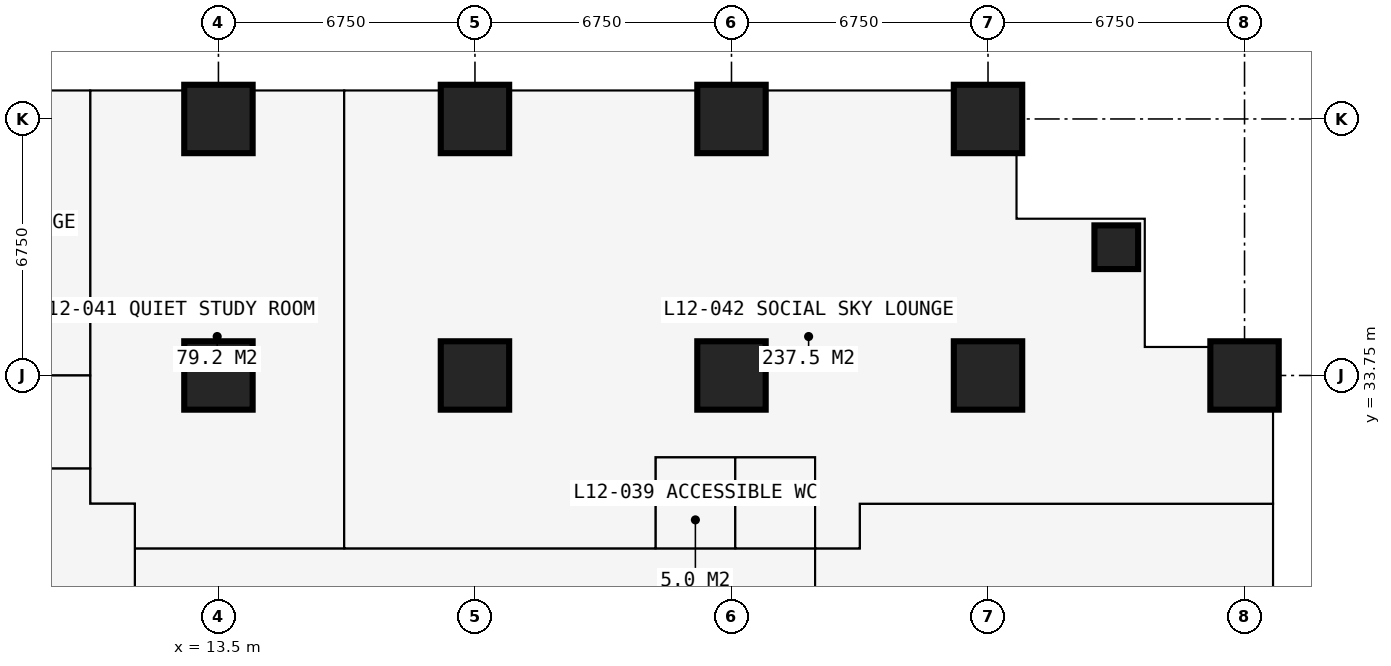
"""IFC4 building model, lengths in metres.
Left out: names, types, materials, properties, quantities, classifications, styles, units other than length and angle.
Written with IfcOpenShell. Run it as: python <this file> out.ifc"""

import sys

from ifc_helpers import new_model, si_unit, direction, frame, frame_2d, origin, origin_2d, place, context, subcontext, project, spatial, rectangle, extrude, element, fill, save


model = new_model("IFC4")
c1 = context("Model", 3, precision=1e-05, world=origin(), true_north=direction((0.0, 1.0)))
c2 = subcontext(c1, "Body", "Model", "MODEL_VIEW")
j1 = project(units=[si_unit("LENGTHUNIT", "METRE"), si_unit("PLANEANGLEUNIT", "RADIAN")], contexts=[c1])
p1 = place(None, origin())
s1 = spatial("IfcSite", under=j1, at=p1, CompositionType="ELEMENT")
p2 = place(p1, origin())
s2 = spatial("IfcBuilding", under=s1, at=p2, CompositionType="ELEMENT")
p3 = place(p2, frame((0.0, 0.0, 46.8)))
s3 = spatial("IfcBuildingStorey", under=s2, at=p3, CompositionType="ELEMENT", Elevation=46.8)
for number, where, z_axis, x_axis in (
    (1, (13.5, 33.75, 0.0), (0.0, 0.0, 1.0), (1.0, 0.0, 0.0)),
    (2, (13.5, 40.5, 0.0), (0.0, 0.0, 1.0), (1.0, 0.0, 0.0)),
    (3, (20.25, 33.75, 0.0), (0.0, 0.0, 1.0), (1.0, 0.0, 0.0)),
    (4, (20.25, 40.5, 0.0), (0.0, 0.0, 1.0), (1.0, 0.0, 0.0)),
    (5, (27.0, 33.75, 0.0), (0.0, 0.0, 1.0), (1.0, 0.0, 0.0)),
    (6, (27.0, 40.5, 0.0), (0.0, 0.0, 1.0), (1.0, 0.0, 0.0)),
    (7, (33.75, 33.75, 0.0), (0.0, 0.0, 1.0), (1.0, 0.0, 0.0)),
    (8, (33.75, 40.5, 0.0), (0.0, 0.0, 1.0), (1.0, 0.0, 0.0)),
):
    element("IfcColumn", number, at=place(p3, frame(where, z_axis=z_axis, x_axis=x_axis)), inside=s3, PredefinedType="COLUMN", context=c2, shape_type="SweptSolid", body=[
        extrude(rectangle(XDim=1.8, YDim=1.8, at=origin_2d()), origin(), (0.0, 0.0, 1.0), 3.6),
    ])
p4 = place(p3, frame((37.125, 37.125, 0.0), z_axis=(0.0, 0.0, 1.0), x_axis=(1.0, 0.0, 0.0)))
e9 = element("IfcColumn", 9, at=p4, inside=s3, PredefinedType="COLUMN", context=c2, shape_type="SweptSolid", body=[
    extrude(rectangle(XDim=1.15, YDim=1.15, at=origin_2d()), origin(), (0.0, 0.0, 1.0), 3.6),
])
p5 = place(p3, frame((40.5, 33.75, 0.0), z_axis=(0.0, 0.0, 1.0), x_axis=(1.0, 0.0, 0.0)))
e10 = element("IfcColumn", 10, at=p5, inside=s3, PredefinedType="COLUMN", context=c2, shape_type="SweptSolid", body=[
    extrude(rectangle(XDim=1.8, YDim=1.8, at=origin_2d()), origin(), (0.0, 0.0, 1.0), 3.6),
])
p6 = place(p3, frame((41.25, 34.5, 0.0), z_axis=(0.0, 0.0, 1.0), x_axis=(-1.0, 0.0, 0.0)))
e11 = element("IfcWall", 11, at=p6, inside=s3, PredefinedType="SOLIDWALL", context=c2, shape_type="SweptSolid", body=[
    extrude(rectangle(XDim=3.375, YDim=0.3, at=frame_2d((1.688, 0.0))), origin(), (0.0, 0.0, 1.0), 3.375),
])
p7 = place(p6, frame((1.833, 0.0, 0.9)))
e12 = element("IfcOpeningElement", 12, at=p7, cuts=e11, PredefinedType="OPENING", context=c2, shape_type="SweptSolid", body=[
    extrude(rectangle(XDim=1.2, YDim=1.8, at=frame_2d((0.6, 0.9))), frame((0.0, 0.16, 0.0), z_axis=(0.0, -1.0, 0.0), x_axis=(1.0, 0.0, 0.0)), (0.0, 0.0, 1.0), 0.32),
])
p8 = place(p3, frame((37.875, 34.5, 0.0), z_axis=(0.0, 0.0, 1.0), x_axis=(0.0, 1.0, 0.0)))
e13 = element("IfcWall", 13, at=p8, inside=s3, PredefinedType="SOLIDWALL", context=c2, shape_type="SweptSolid", body=[
    extrude(rectangle(XDim=3.375, YDim=0.3, at=frame_2d((1.688, 0.0))), origin(), (0.0, 0.0, 1.0), 3.375),
])
p9 = place(p8, frame((0.788, 0.0, 0.6)))
e14 = element("IfcOpeningElement", 14, at=p9, cuts=e13, PredefinedType="OPENING", context=c2, shape_type="SweptSolid", body=[
    extrude(rectangle(XDim=1.8, YDim=2.1, at=frame_2d((0.9, 1.05))), frame((0.0, 0.16, 0.0), z_axis=(0.0, -1.0, 0.0), x_axis=(1.0, 0.0, 0.0)), (0.0, 0.0, 1.0), 0.32),
])
p10 = place(p3, frame((37.875, 37.875, 0.0), z_axis=(0.0, 0.0, 1.0), x_axis=(-1.0, 0.0, 0.0)))
e15 = element("IfcWall", 15, at=p10, inside=s3, PredefinedType="SOLIDWALL", context=c2, shape_type="SweptSolid", body=[
    extrude(rectangle(XDim=3.375, YDim=0.3, at=frame_2d((1.688, 0.0))), origin(), (0.0, 0.0, 1.0), 3.375),
])
p11 = place(p10, frame((0.788, 0.0, 0.6)))
e16 = element("IfcOpeningElement", 16, at=p11, cuts=e15, PredefinedType="OPENING", context=c2, shape_type="SweptSolid", body=[
    extrude(rectangle(XDim=1.8, YDim=2.1, at=frame_2d((0.9, 1.05))), frame((0.0, 0.16, 0.0), z_axis=(0.0, -1.0, 0.0), x_axis=(1.0, 0.0, 0.0)), (0.0, 0.0, 1.0), 0.32),
])
p12 = place(p3, frame((34.5, 37.875, 0.0), z_axis=(0.0, 0.0, 1.0), x_axis=(0.0, 1.0, 0.0)))
e17 = element("IfcWall", 17, at=p12, inside=s3, PredefinedType="SOLIDWALL", context=c2, shape_type="SweptSolid", body=[
    extrude(rectangle(XDim=3.375, YDim=0.3, at=frame_2d((1.688, 0.0))), origin(), (0.0, 0.0, 1.0), 3.375),
])
p13 = place(p12, frame((0.343, 0.0, 0.9)))
e18 = element("IfcOpeningElement", 18, at=p13, cuts=e17, PredefinedType="OPENING", context=c2, shape_type="SweptSolid", body=[
    extrude(rectangle(XDim=1.2, YDim=1.8, at=frame_2d((0.6, 0.9))), frame((0.0, 0.16, 0.0), z_axis=(0.0, -1.0, 0.0), x_axis=(1.0, 0.0, 0.0)), (0.0, 0.0, 1.0), 0.32),
])
p14 = place(p3, frame((13.5, 41.25, 0.0), z_axis=(0.0, 0.0, 1.0), x_axis=(1.0, 0.0, 0.0)))
e19 = element("IfcWall", 19, at=p14, inside=s3, PredefinedType="SOLIDWALL", context=c2, shape_type="SweptSolid", body=[
    extrude(rectangle(XDim=6.75, YDim=0.15, at=frame_2d((3.375, 0.0))), origin(), (0.0, 0.0, 1.0), 3.375),
])
p15 = place(p14, frame((0.962, 0.0, 0.0)))
e20 = element("IfcOpeningElement", 20, at=p15, cuts=e19, PredefinedType="OPENING", context=c2, shape_type="SweptSolid", body=[
    extrude(rectangle(XDim=1.0, YDim=2.2, at=frame_2d((0.5, 1.1))), frame((0.0, 0.085, 0.0), z_axis=(0.0, -1.0, 0.0), x_axis=(1.0, 0.0, 0.0)), (0.0, 0.0, 1.0), 0.17),
])
p16 = place(p14, frame((2.025, 0.0, 0.9)))
e21 = element("IfcOpeningElement", 21, at=p16, cuts=e19, PredefinedType="OPENING", context=c2, shape_type="SweptSolid", body=[
    extrude(rectangle(XDim=1.2, YDim=1.8, at=frame_2d((0.6, 0.9))), frame((0.0, 0.085, 0.0), z_axis=(0.0, -1.0, 0.0), x_axis=(1.0, 0.0, 0.0)), (0.0, 0.0, 1.0), 0.17),
])
p17 = place(p14, frame((4.788, 0.0, 0.0)))
e22 = element("IfcOpeningElement", 22, at=p17, cuts=e19, PredefinedType="OPENING", context=c2, shape_type="SweptSolid", body=[
    extrude(rectangle(XDim=1.0, YDim=2.2, at=frame_2d((0.5, 1.1))), frame((0.0, 0.085, 0.0), z_axis=(0.0, -1.0, 0.0), x_axis=(1.0, 0.0, 0.0)), (0.0, 0.0, 1.0), 0.17),
])
p18 = place(p14, frame((3.525, 0.0, 0.9)))
e23 = element("IfcOpeningElement", 23, at=p18, cuts=e19, PredefinedType="OPENING", context=c2, shape_type="SweptSolid", body=[
    extrude(rectangle(XDim=1.2, YDim=1.8, at=frame_2d((0.6, 0.9))), frame((0.0, 0.085, 0.0), z_axis=(0.0, -1.0, 0.0), x_axis=(1.0, 0.0, 0.0)), (0.0, 0.0, 1.0), 0.17),
])
p19 = place(p3, frame((20.25, 41.25, 0.0), z_axis=(0.0, 0.0, 1.0), x_axis=(1.0, 0.0, 0.0)))
e24 = element("IfcWall", 24, at=p19, inside=s3, PredefinedType="SOLIDWALL", context=c2, shape_type="SweptSolid", body=[
    extrude(rectangle(XDim=6.75, YDim=0.15, at=frame_2d((3.375, 0.0))), origin(), (0.0, 0.0, 1.0), 3.375),
])
p20 = place(p19, frame((0.962, 0.0, 0.0)))
e25 = element("IfcOpeningElement", 25, at=p20, cuts=e24, PredefinedType="OPENING", context=c2, shape_type="SweptSolid", body=[
    extrude(rectangle(XDim=1.0, YDim=2.2, at=frame_2d((0.5, 1.1))), frame((0.0, 0.085, 0.0), z_axis=(0.0, -1.0, 0.0), x_axis=(1.0, 0.0, 0.0)), (0.0, 0.0, 1.0), 0.17),
])
p21 = place(p19, frame((2.025, 0.0, 0.9)))
e26 = element("IfcOpeningElement", 26, at=p21, cuts=e24, PredefinedType="OPENING", context=c2, shape_type="SweptSolid", body=[
    extrude(rectangle(XDim=1.2, YDim=1.8, at=frame_2d((0.6, 0.9))), frame((0.0, 0.085, 0.0), z_axis=(0.0, -1.0, 0.0), x_axis=(1.0, 0.0, 0.0)), (0.0, 0.0, 1.0), 0.17),
])
p22 = place(p19, frame((4.788, 0.0, 0.0)))
e27 = element("IfcOpeningElement", 27, at=p22, cuts=e24, PredefinedType="OPENING", context=c2, shape_type="SweptSolid", body=[
    extrude(rectangle(XDim=1.0, YDim=2.2, at=frame_2d((0.5, 1.1))), frame((0.0, 0.085, 0.0), z_axis=(0.0, -1.0, 0.0), x_axis=(1.0, 0.0, 0.0)), (0.0, 0.0, 1.0), 0.17),
])
p23 = place(p19, frame((3.525, 0.0, 0.9)))
e28 = element("IfcOpeningElement", 28, at=p23, cuts=e24, PredefinedType="OPENING", context=c2, shape_type="SweptSolid", body=[
    extrude(rectangle(XDim=1.2, YDim=1.8, at=frame_2d((0.6, 0.9))), frame((0.0, 0.085, 0.0), z_axis=(0.0, -1.0, 0.0), x_axis=(1.0, 0.0, 0.0)), (0.0, 0.0, 1.0), 0.17),
])
for number, where, z_axis, x_axis in (
    (29, (16.875, 41.35, 0.0), (0.0, 0.0, 1.0), (0.0, 1.0, 0.0)),
    (30, (23.625, 41.35, 0.0), (0.0, 0.0, 1.0), (0.0, 1.0, 0.0)),
):
    element("IfcWall", number, at=place(p3, frame(where, z_axis=z_axis, x_axis=x_axis)), inside=s3, PredefinedType="USERDEFINED", context=c2, shape_type="SweptSolid", body=[
        extrude(rectangle(XDim=2.2, YDim=1.0, at=frame_2d((1.1, 0.0))), origin(), (0.0, 0.0, 1.0), 0.9),
    ])
p24 = place(p3, frame((-0.734, 33.75, 0.0), z_axis=(0.0, 0.0, 1.0), x_axis=(1.0, 0.0, 0.0)))
e31 = element("IfcWall", 31, at=p24, inside=s3, PredefinedType="PARTITIONING", context=c2, shape_type="SweptSolid", body=[
    extrude(rectangle(XDim=10.859, YDim=0.15, at=frame_2d((5.429, 0.0))), origin(), (0.0, 0.0, 1.0), 2.877),
])
p25 = place(p24, frame((8.434, 0.0, 0.0)))
e32 = element("IfcOpeningElement", 32, at=p25, cuts=e31, PredefinedType="OPENING", context=c2, shape_type="SweptSolid", body=[
    extrude(rectangle(XDim=1.0, YDim=2.2, at=frame_2d((0.5, 1.1))), frame((0.0, 0.085, 0.0), z_axis=(0.0, -1.0, 0.0), x_axis=(1.0, 0.0, 0.0)), (0.0, 0.0, 1.0), 0.17),
])
p26 = place(p3, frame((5.65, 31.3, 0.0), z_axis=(0.0, 0.0, 1.0), x_axis=(1.0, 0.0, 0.0)))
e33 = element("IfcWall", 33, at=p26, inside=s3, PredefinedType="PARTITIONING", context=c2, shape_type="SweptSolid", body=[
    extrude(rectangle(XDim=4.475, YDim=0.15, at=frame_2d((2.238, 0.0))), origin(), (0.0, 0.0, 1.0), 3.375),
])
p27 = place(p3, frame((10.125, 30.375, 0.0), z_axis=(0.0, 0.0, 1.0), x_axis=(0.0, 1.0, 0.0)))
e34 = element("IfcWall", 34, at=p27, inside=s3, PredefinedType="PARTITIONING", context=c2, shape_type="SweptSolid", body=[
    extrude(rectangle(XDim=10.859, YDim=0.15, at=frame_2d((5.429, 0.0))), origin(), (0.0, 0.0, 1.0), 3.375),
])
p28 = place(p3, frame((10.125, 30.375, 0.0), z_axis=(0.0, 0.0, 1.0), x_axis=(1.0, 0.0, 0.0)))
e35 = element("IfcWall", 35, at=p28, inside=s3, PredefinedType="PARTITIONING", context=c2, shape_type="SweptSolid", body=[
    extrude(rectangle(XDim=1.175, YDim=0.15, at=frame_2d((0.587, 0.0))), origin(), (0.0, 0.0, 1.0), 3.375),
])
p29 = place(p3, frame((11.3, 11.3, 0.0), z_axis=(0.0, 0.0, 1.0), x_axis=(0.0, 1.0, 0.0)))
e36 = element("IfcWall", 36, at=p29, inside=s3, PredefinedType="PARTITIONING", context=c2, shape_type="SweptSolid", body=[
    extrude(rectangle(XDim=19.075, YDim=0.15, at=frame_2d((9.538, 0.0))), origin(), (0.0, 0.0, 1.0), 3.375),
])
p30 = place(p29, frame((10.137, 0.0, 0.0)))
e37 = element("IfcOpeningElement", 37, at=p30, cuts=e36, PredefinedType="OPENING", context=c2, shape_type="SweptSolid", body=[
    extrude(rectangle(XDim=1.0, YDim=2.2, at=frame_2d((0.5, 1.1))), frame((0.0, 0.085, 0.0), z_axis=(0.0, -1.0, 0.0), x_axis=(1.0, 0.0, 0.0)), (0.0, 0.0, 1.0), 0.17),
])
p31 = place(p3, frame((11.3, 29.2, 0.0), z_axis=(0.0, 0.0, 1.0), x_axis=(1.0, 0.0, 0.0)))
e38 = element("IfcWall", 38, at=p31, inside=s3, PredefinedType="PARTITIONING", context=c2, shape_type="SweptSolid", body=[
    extrude(rectangle(XDim=19.075, YDim=0.15, at=frame_2d((9.538, 0.0))), origin(), (0.0, 0.0, 1.0), 3.375),
])
p32 = place(p31, frame((14.25, 0.0, 0.0)))
e39 = element("IfcOpeningElement", 39, at=p32, cuts=e38, PredefinedType="OPENING", context=c2, shape_type="SweptSolid", body=[
    extrude(rectangle(XDim=1.0, YDim=2.2, at=frame_2d((0.5, 1.1))), frame((0.0, 0.085, 0.0), z_axis=(0.0, -1.0, 0.0), x_axis=(1.0, 0.0, 0.0)), (0.0, 0.0, 1.0), 0.17),
])
p33 = place(p31, frame((16.35, 0.0, 0.0)))
e40 = element("IfcOpeningElement", 40, at=p33, cuts=e38, PredefinedType="OPENING", context=c2, shape_type="SweptSolid", body=[
    extrude(rectangle(XDim=1.0, YDim=2.2, at=frame_2d((0.5, 1.1))), frame((0.0, 0.085, 0.0), z_axis=(0.0, -1.0, 0.0), x_axis=(1.0, 0.0, 0.0)), (0.0, 0.0, 1.0), 0.17),
])
p34 = place(p31, frame((8.859, 0.0, 0.0)))
e41 = element("IfcOpeningElement", 41, at=p34, cuts=e38, PredefinedType="OPENING", context=c2, shape_type="SweptSolid", body=[
    extrude(rectangle(XDim=1.5, YDim=2.2, at=frame_2d((0.75, 1.1))), frame((0.0, 0.085, 0.0), z_axis=(0.0, -1.0, 0.0), x_axis=(1.0, 0.0, 0.0)), (0.0, 0.0, 1.0), 0.17),
])
p35 = place(p3, frame((16.809, 29.2, 0.0), z_axis=(0.0, 0.0, 1.0), x_axis=(0.0, 1.0, 0.0)))
e42 = element("IfcWall", 42, at=p35, inside=s3, PredefinedType="PARTITIONING", context=c2, shape_type="SweptSolid", body=[
    extrude(rectangle(XDim=12.034, YDim=0.15, at=frame_2d((6.017, 0.0))), origin(), (0.0, 0.0, 1.0), 3.375),
])
p36 = place(p35, frame((5.2, 0.0, 0.0)))
e43 = element("IfcOpeningElement", 43, at=p36, cuts=e42, PredefinedType="OPENING", context=c2, shape_type="SweptSolid", body=[
    extrude(rectangle(XDim=1.6, YDim=2.4, at=frame_2d((0.8, 1.2))), frame((0.0, 0.085, 0.0), z_axis=(0.0, -1.0, 0.0), x_axis=(1.0, 0.0, 0.0)), (0.0, 0.0, 1.0), 0.17),
])
p37 = place(p3, frame((25.0, 29.2, 0.0), z_axis=(0.0, 0.0, 1.0), x_axis=(0.0, 1.0, 0.0)))
e44 = element("IfcWall", 44, at=p37, inside=s3, PredefinedType="PARTITIONING", context=c2, shape_type="SweptSolid", body=[
    extrude(rectangle(XDim=2.4, YDim=0.1, at=frame_2d((1.2, 0.0))), origin(), (0.0, 0.0, 1.0), 3.375),
])
p38 = place(p3, frame((25.0, 31.6, 0.0), z_axis=(0.0, 0.0, 1.0), x_axis=(1.0, 0.0, 0.0)))
e45 = element("IfcWall", 45, at=p38, inside=s3, PredefinedType="PARTITIONING", context=c2, shape_type="SweptSolid", body=[
    extrude(rectangle(XDim=4.2, YDim=0.15, at=frame_2d((2.1, 0.0))), origin(), (0.0, 0.0, 1.0), 3.375),
])
p39 = place(p3, frame((27.1, 29.2, 0.0), z_axis=(0.0, 0.0, 1.0), x_axis=(0.0, 1.0, 0.0)))
e46 = element("IfcWall", 46, at=p39, inside=s3, PredefinedType="PARTITIONING", context=c2, shape_type="SweptSolid", body=[
    extrude(rectangle(XDim=2.4, YDim=0.1, at=frame_2d((1.2, 0.0))), origin(), (0.0, 0.0, 1.0), 2.877),
])
p40 = place(p3, frame((29.2, 11.3, 0.0), z_axis=(0.0, 0.0, 1.0), x_axis=(0.0, 1.0, 0.0)))
e47 = element("IfcWall", 47, at=p40, inside=s3, PredefinedType="PARTITIONING", context=c2, shape_type="SweptSolid", body=[
    extrude(rectangle(XDim=20.3, YDim=0.15, at=frame_2d((10.15, 0.0))), origin(), (0.0, 0.0, 1.0), 3.375),
])
p41 = place(p40, frame((8.35, 0.0, 0.0)))
e48 = element("IfcOpeningElement", 48, at=p41, cuts=e47, PredefinedType="OPENING", context=c2, shape_type="SweptSolid", body=[
    extrude(rectangle(XDim=1.2, YDim=2.2, at=frame_2d((0.6, 1.1))), frame((0.0, 0.085, 0.0), z_axis=(0.0, -1.0, 0.0), x_axis=(1.0, 0.0, 0.0)), (0.0, 0.0, 1.0), 0.17),
])
p42 = place(p3, frame((30.375, 29.2, 0.0), z_axis=(0.0, 0.0, 1.0), x_axis=(0.0, 1.0, 0.0)))
e49 = element("IfcWall", 49, at=p42, inside=s3, PredefinedType="PARTITIONING", context=c2, shape_type="SweptSolid", body=[
    extrude(rectangle(XDim=1.175, YDim=0.15, at=frame_2d((0.587, 0.0))), origin(), (0.0, 0.0, 1.0), 3.375),
])
p43 = place(p3, frame((30.375, 30.375, 0.0), z_axis=(0.0, 0.0, 1.0), x_axis=(1.0, 0.0, 0.0)))
e50 = element("IfcWall", 50, at=p43, inside=s3, PredefinedType="PARTITIONING", context=c2, shape_type="SweptSolid", body=[
    extrude(rectangle(XDim=10.859, YDim=0.15, at=frame_2d((5.429, 0.0))), origin(), (0.0, 0.0, 1.0), 3.375),
])
p44 = place(p7, origin())
e51 = element("IfcWindow", 51, at=p44, inside=s3, PartitioningType="SINGLE_PANEL", PredefinedType="WINDOW", context=c2, shape_type="SweptSolid", body=[
    extrude(rectangle(XDim=1.2, YDim=1.8, at=frame_2d((0.6, 0.9))), frame((0.0, 0.03, 0.0), z_axis=(0.0, -1.0, 0.0), x_axis=(1.0, 0.0, 0.0)), (0.0, 0.0, 1.0), 0.06),
])
fill(e12, e51)
p45 = place(p9, origin())
e52 = element("IfcWindow", 52, at=p45, inside=s3, PartitioningType="SINGLE_PANEL", PredefinedType="WINDOW", context=c2, shape_type="SweptSolid", body=[
    extrude(rectangle(XDim=1.8, YDim=2.1, at=frame_2d((0.9, 1.05))), frame((0.0, 0.03, 0.0), z_axis=(0.0, -1.0, 0.0), x_axis=(1.0, 0.0, 0.0)), (0.0, 0.0, 1.0), 0.06),
])
fill(e14, e52)
p46 = place(p11, origin())
e53 = element("IfcWindow", 53, at=p46, inside=s3, PartitioningType="SINGLE_PANEL", PredefinedType="WINDOW", context=c2, shape_type="SweptSolid", body=[
    extrude(rectangle(XDim=1.8, YDim=2.1, at=frame_2d((0.9, 1.05))), frame((0.0, 0.03, 0.0), z_axis=(0.0, -1.0, 0.0), x_axis=(1.0, 0.0, 0.0)), (0.0, 0.0, 1.0), 0.06),
])
fill(e16, e53)
p47 = place(p13, origin())
e54 = element("IfcWindow", 54, at=p47, inside=s3, PartitioningType="SINGLE_PANEL", PredefinedType="WINDOW", context=c2, shape_type="SweptSolid", body=[
    extrude(rectangle(XDim=1.2, YDim=1.8, at=frame_2d((0.6, 0.9))), frame((0.0, 0.03, 0.0), z_axis=(0.0, -1.0, 0.0), x_axis=(1.0, 0.0, 0.0)), (0.0, 0.0, 1.0), 0.06),
])
fill(e18, e54)
p48 = place(p15, origin())
e55 = element("IfcDoor", 55, at=p48, inside=s3, OperationType="SINGLE_SWING_LEFT", PredefinedType="DOOR", context=c2, shape_type="SweptSolid", body=[
    extrude(rectangle(XDim=1.0, YDim=2.2, at=frame_2d((0.5, 1.1))), frame((0.0, 0.025, 0.0), z_axis=(0.0, -1.0, 0.0), x_axis=(1.0, 0.0, 0.0)), (0.0, 0.0, 1.0), 0.05),
])
fill(e20, e55)
p49 = place(p16, origin())
e56 = element("IfcWindow", 56, at=p49, inside=s3, PartitioningType="SINGLE_PANEL", PredefinedType="WINDOW", context=c2, shape_type="SweptSolid", body=[
    extrude(rectangle(XDim=1.2, YDim=1.8, at=frame_2d((0.6, 0.9))), frame((0.0, 0.03, 0.0), z_axis=(0.0, -1.0, 0.0), x_axis=(1.0, 0.0, 0.0)), (0.0, 0.0, 1.0), 0.06),
])
fill(e21, e56)
p50 = place(p17, origin())
e57 = element("IfcDoor", 57, at=p50, inside=s3, OperationType="SINGLE_SWING_RIGHT", PredefinedType="DOOR", context=c2, shape_type="SweptSolid", body=[
    extrude(rectangle(XDim=1.0, YDim=2.2, at=frame_2d((0.5, 1.1))), frame((0.0, 0.025, 0.0), z_axis=(0.0, -1.0, 0.0), x_axis=(1.0, 0.0, 0.0)), (0.0, 0.0, 1.0), 0.05),
])
fill(e22, e57)
p51 = place(p18, origin())
e58 = element("IfcWindow", 58, at=p51, inside=s3, PartitioningType="SINGLE_PANEL", PredefinedType="WINDOW", context=c2, shape_type="SweptSolid", body=[
    extrude(rectangle(XDim=1.2, YDim=1.8, at=frame_2d((0.6, 0.9))), frame((0.0, 0.03, 0.0), z_axis=(0.0, -1.0, 0.0), x_axis=(1.0, 0.0, 0.0)), (0.0, 0.0, 1.0), 0.06),
])
fill(e23, e58)
p52 = place(p20, origin())
e59 = element("IfcDoor", 59, at=p52, inside=s3, OperationType="SINGLE_SWING_LEFT", PredefinedType="DOOR", context=c2, shape_type="SweptSolid", body=[
    extrude(rectangle(XDim=1.0, YDim=2.2, at=frame_2d((0.5, 1.1))), frame((0.0, 0.025, 0.0), z_axis=(0.0, -1.0, 0.0), x_axis=(1.0, 0.0, 0.0)), (0.0, 0.0, 1.0), 0.05),
])
fill(e25, e59)
p53 = place(p21, origin())
e60 = element("IfcWindow", 60, at=p53, inside=s3, PartitioningType="SINGLE_PANEL", PredefinedType="WINDOW", context=c2, shape_type="SweptSolid", body=[
    extrude(rectangle(XDim=1.2, YDim=1.8, at=frame_2d((0.6, 0.9))), frame((0.0, 0.03, 0.0), z_axis=(0.0, -1.0, 0.0), x_axis=(1.0, 0.0, 0.0)), (0.0, 0.0, 1.0), 0.06),
])
fill(e26, e60)
p54 = place(p22, origin())
e61 = element("IfcDoor", 61, at=p54, inside=s3, OperationType="SINGLE_SWING_RIGHT", PredefinedType="DOOR", context=c2, shape_type="SweptSolid", body=[
    extrude(rectangle(XDim=1.0, YDim=2.2, at=frame_2d((0.5, 1.1))), frame((0.0, 0.025, 0.0), z_axis=(0.0, -1.0, 0.0), x_axis=(1.0, 0.0, 0.0)), (0.0, 0.0, 1.0), 0.05),
])
fill(e27, e61)
p55 = place(p23, origin())
e62 = element("IfcWindow", 62, at=p55, inside=s3, PartitioningType="SINGLE_PANEL", PredefinedType="WINDOW", context=c2, shape_type="SweptSolid", body=[
    extrude(rectangle(XDim=1.2, YDim=1.8, at=frame_2d((0.6, 0.9))), frame((0.0, 0.03, 0.0), z_axis=(0.0, -1.0, 0.0), x_axis=(1.0, 0.0, 0.0)), (0.0, 0.0, 1.0), 0.06),
])
fill(e28, e62)
p56 = place(p32, origin())
e63 = element("IfcDoor", 63, at=p56, inside=s3, OperationType="SINGLE_SWING_LEFT", PredefinedType="DOOR", context=c2, shape_type="SweptSolid", body=[
    extrude(rectangle(XDim=1.0, YDim=2.2, at=frame_2d((0.5, 1.1))), frame((0.0, 0.025, 0.0), z_axis=(0.0, -1.0, 0.0), x_axis=(1.0, 0.0, 0.0)), (0.0, 0.0, 1.0), 0.05),
])
fill(e39, e63)
p57 = place(p33, origin())
e64 = element("IfcDoor", 64, at=p57, inside=s3, OperationType="SINGLE_SWING_LEFT", PredefinedType="DOOR", context=c2, shape_type="SweptSolid", body=[
    extrude(rectangle(XDim=1.0, YDim=2.2, at=frame_2d((0.5, 1.1))), frame((0.0, 0.025, 0.0), z_axis=(0.0, -1.0, 0.0), x_axis=(1.0, 0.0, 0.0)), (0.0, 0.0, 1.0), 0.05),
])
fill(e40, e64)
p58 = place(p36, origin())
e65 = element("IfcDoor", 65, at=p58, inside=s3, OperationType="DOUBLE_DOOR_SINGLE_SWING", PredefinedType="DOOR", context=c2, shape_type="SweptSolid", body=[
    extrude(rectangle(XDim=1.6, YDim=2.4, at=frame_2d((0.8, 1.2))), frame((0.0, 0.025, 0.0), z_axis=(0.0, -1.0, 0.0), x_axis=(1.0, 0.0, 0.0)), (0.0, 0.0, 1.0), 0.05),
])
fill(e43, e65)
p59 = place(p34, origin())
e66 = element("IfcDoor", 66, at=p59, inside=s3, OperationType="DOUBLE_DOOR_SINGLE_SWING", PredefinedType="DOOR", context=c2, shape_type="SweptSolid", body=[
    extrude(rectangle(XDim=1.5, YDim=2.2, at=frame_2d((0.75, 1.1))), frame((0.0, 0.025, 0.0), z_axis=(0.0, -1.0, 0.0), x_axis=(1.0, 0.0, 0.0)), (0.0, 0.0, 1.0), 0.05),
])
fill(e41, e66)
save(model, sys.argv[1])
